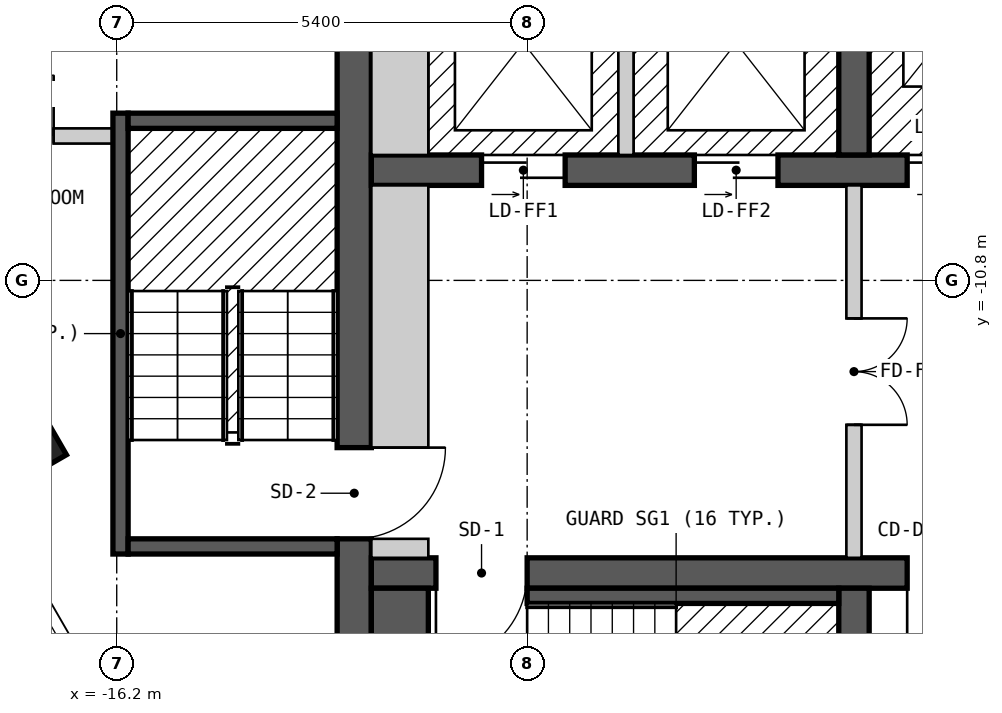
"""IFC4 building model, lengths in metres.
Left out: names, types, materials, properties, quantities, classifications, styles, units other than length and angle.
Written with IfcOpenShell. Run it as: python <this file> out.ifc"""

import sys

from ifc_helpers import new_model, si_unit, direction, frame, frame_2d, origin, origin_2d, place, context, subcontext, project, spatial, polyline, rectangle, outline, extrude, element, fill, save


model = new_model("IFC4")
c1 = context("Model", 3, precision=1e-05, world=origin(), true_north=direction((0.0, 1.0)))
c2 = subcontext(c1, "Body", "Model", "MODEL_VIEW")
j1 = project(units=[si_unit("LENGTHUNIT", "METRE"), si_unit("PLANEANGLEUNIT", "RADIAN")], contexts=[c1])
p1 = place(None, origin())
s1 = spatial("IfcSite", under=j1, at=p1, CompositionType="ELEMENT")
p2 = place(p1, origin())
s2 = spatial("IfcBuilding", under=s1, at=p2, CompositionType="ELEMENT")
p3 = place(p2, frame((0.0, 0.0, 229.8)))
s3 = spatial("IfcBuildingStorey", under=s2, at=p3, CompositionType="ELEMENT", Elevation=229.8)
p4 = place(p3, frame((-17.34, -12.966, 0.0), z_axis=(0.0, 0.0, 1.0), x_axis=(0.499984884929, -0.866034130299, 0.0)))
e1 = element("IfcColumn", 1, at=p4, inside=s3, PredefinedType="COLUMN", context=c2, shape_type="SweptSolid", body=[
    extrude(rectangle(XDim=0.7, YDim=0.7, at=origin_2d()), origin(), (0.0, 0.0, 1.0), 3.0),
])
p5 = place(p3, frame((-13.075, -18.55, 0.0), z_axis=(0.0, 0.0, 1.0), x_axis=(0.0, 1.0, 0.0)))
e2 = element("IfcWall", 2, at=p5, inside=s3, PredefinedType="SHEAR", context=c2, shape_type="SweptSolid", body=[
    extrude(rectangle(XDim=13.1, YDim=0.45, at=frame_2d((6.55, 0.0))), origin(), (0.0, 0.0, 1.0), 2.7),
])
p6 = place(p5, frame((4.35, 0.0, 0.0)))
e3 = element("IfcOpeningElement", 3, at=p6, cuts=e2, PredefinedType="OPENING", context=c2, shape_type="SweptSolid", body=[
    extrude(rectangle(XDim=1.2, YDim=2.1, at=frame_2d((0.6, 1.05))), frame((0.0, 0.235, 0.0), z_axis=(0.0, -1.0, 0.0), x_axis=(1.0, 0.0, 0.0)), (0.0, 0.0, 1.0), 0.47),
])
p7 = place(p3, frame((-12.85, -14.65, 0.0), z_axis=(0.0, 0.0, 1.0), x_axis=(1.0, 0.0, 0.0)))
e4 = element("IfcWall", 4, at=p7, inside=s3, PredefinedType="SHEAR", context=c2, shape_type="SweptSolid", body=[
    extrude(rectangle(XDim=25.7, YDim=0.4, at=frame_2d((12.85, 0.0))), origin(), (0.0, 0.0, 1.0), 2.7),
])
p8 = place(p7, frame((2.05, 0.0, 0.0), z_axis=(0.0, 0.0, 1.0), x_axis=(-1.0, 0.0, 0.0)))
e5 = element("IfcOpeningElement", 5, at=p8, cuts=e4, PredefinedType="OPENING", context=c2, shape_type="SweptSolid", body=[
    extrude(rectangle(XDim=1.2, YDim=2.1, at=frame_2d((0.6, 1.05))), frame((0.0, 0.21, 0.0), z_axis=(0.0, -1.0, 0.0), x_axis=(1.0, 0.0, 0.0)), (0.0, 0.0, 1.0), 0.42),
])
p9 = place(p7, frame((24.9, 0.0, 0.0), z_axis=(0.0, 0.0, 1.0), x_axis=(-1.0, 0.0, 0.0)))
e6 = element("IfcOpeningElement", 6, at=p9, cuts=e4, PredefinedType="OPENING", context=c2, shape_type="SweptSolid", body=[
    extrude(rectangle(XDim=1.2, YDim=2.1, at=frame_2d((0.6, 1.05))), frame((0.0, 0.21, 0.0), z_axis=(0.0, -1.0, 0.0), x_axis=(1.0, 0.0, 0.0)), (0.0, 0.0, 1.0), 0.42),
])
p10 = place(p7, frame((7.95, 0.0, 0.0), z_axis=(0.0, 0.0, 1.0), x_axis=(-1.0, 0.0, 0.0)))
e7 = element("IfcOpeningElement", 7, at=p10, cuts=e4, PredefinedType="OPENING", context=c2, shape_type="SweptSolid", body=[
    extrude(rectangle(XDim=0.9, YDim=2.1, at=frame_2d((0.45, 1.05))), frame((0.0, 0.21, 0.0), z_axis=(0.0, -1.0, 0.0), x_axis=(1.0, 0.0, 0.0)), (0.0, 0.0, 1.0), 0.42),
])
p11 = place(p7, frame((10.0, 0.0, 0.0), z_axis=(0.0, 0.0, 1.0), x_axis=(-1.0, 0.0, 0.0)))
e8 = element("IfcOpeningElement", 8, at=p11, cuts=e4, PredefinedType="OPENING", context=c2, shape_type="SweptSolid", body=[
    extrude(rectangle(XDim=0.9, YDim=2.1, at=frame_2d((0.45, 1.05))), frame((0.0, 0.21, 0.0), z_axis=(0.0, -1.0, 0.0), x_axis=(1.0, 0.0, 0.0)), (0.0, 0.0, 1.0), 0.42),
])
p12 = place(p7, frame((12.3, 0.0, 0.0), z_axis=(0.0, 0.0, 1.0), x_axis=(-1.0, 0.0, 0.0)))
e9 = element("IfcOpeningElement", 9, at=p12, cuts=e4, PredefinedType="OPENING", context=c2, shape_type="SweptSolid", body=[
    extrude(rectangle(XDim=1.0, YDim=2.1, at=frame_2d((0.5, 1.05))), frame((0.0, 0.21, 0.0), z_axis=(0.0, -1.0, 0.0), x_axis=(1.0, 0.0, 0.0)), (0.0, 0.0, 1.0), 0.42),
])
p13 = place(p7, frame((14.5, 0.0, 0.0), z_axis=(0.0, 0.0, 1.0), x_axis=(-1.0, 0.0, 0.0)))
e10 = element("IfcOpeningElement", 10, at=p13, cuts=e4, PredefinedType="OPENING", context=c2, shape_type="SweptSolid", body=[
    extrude(rectangle(XDim=0.9, YDim=2.1, at=frame_2d((0.45, 1.05))), frame((0.0, 0.21, 0.0), z_axis=(0.0, -1.0, 0.0), x_axis=(1.0, 0.0, 0.0)), (0.0, 0.0, 1.0), 0.42),
])
p14 = place(p7, frame((16.5, 0.0, 0.0), z_axis=(0.0, 0.0, 1.0), x_axis=(-1.0, 0.0, 0.0)))
e11 = element("IfcOpeningElement", 11, at=p14, cuts=e4, PredefinedType="OPENING", context=c2, shape_type="SweptSolid", body=[
    extrude(rectangle(XDim=0.9, YDim=2.1, at=frame_2d((0.45, 1.05))), frame((0.0, 0.21, 0.0), z_axis=(0.0, -1.0, 0.0), x_axis=(1.0, 0.0, 0.0)), (0.0, 0.0, 1.0), 0.42),
])
p15 = place(p7, frame((18.65, 0.0, 0.0), z_axis=(0.0, 0.0, 1.0), x_axis=(-1.0, 0.0, 0.0)))
e12 = element("IfcOpeningElement", 12, at=p15, cuts=e4, PredefinedType="OPENING", context=c2, shape_type="SweptSolid", body=[
    extrude(rectangle(XDim=1.0, YDim=2.1, at=frame_2d((0.5, 1.05))), frame((0.0, 0.21, 0.0), z_axis=(0.0, -1.0, 0.0), x_axis=(1.0, 0.0, 0.0)), (0.0, 0.0, 1.0), 0.42),
])
p16 = place(p3, frame((-12.85, -9.35, 0.0), z_axis=(0.0, 0.0, 1.0), x_axis=(1.0, 0.0, 0.0)))
e13 = element("IfcWall", 13, at=p16, inside=s3, PredefinedType="SHEAR", context=c2, shape_type="SweptSolid", body=[
    extrude(rectangle(XDim=23.05, YDim=0.4, at=frame_2d((11.525, 0.0))), origin(), (0.0, 0.0, 1.0), 2.7),
])
p17 = place(p16, frame((1.45, 0.0, 0.0)))
e14 = element("IfcOpeningElement", 14, at=p17, cuts=e13, PredefinedType="OPENING", context=c2, shape_type="SweptSolid", body=[
    extrude(rectangle(XDim=1.1, YDim=2.1, at=frame_2d((0.55, 1.05))), frame((0.0, 0.21, 0.0), z_axis=(0.0, -1.0, 0.0), x_axis=(1.0, 0.0, 0.0)), (0.0, 0.0, 1.0), 0.42),
])
p18 = place(p16, frame((4.25, 0.0, 0.0)))
e15 = element("IfcOpeningElement", 15, at=p18, cuts=e13, PredefinedType="OPENING", context=c2, shape_type="SweptSolid", body=[
    extrude(rectangle(XDim=1.1, YDim=2.1, at=frame_2d((0.55, 1.05))), frame((0.0, 0.21, 0.0), z_axis=(0.0, -1.0, 0.0), x_axis=(1.0, 0.0, 0.0)), (0.0, 0.0, 1.0), 0.42),
])
p19 = place(p16, frame((7.05, 0.0, 0.0)))
e16 = element("IfcOpeningElement", 16, at=p19, cuts=e13, PredefinedType="OPENING", context=c2, shape_type="SweptSolid", body=[
    extrude(rectangle(XDim=1.1, YDim=2.1, at=frame_2d((0.55, 1.05))), frame((0.0, 0.21, 0.0), z_axis=(0.0, -1.0, 0.0), x_axis=(1.0, 0.0, 0.0)), (0.0, 0.0, 1.0), 0.42),
])
p20 = place(p16, frame((9.35, 0.0, 0.0)))
e17 = element("IfcOpeningElement", 17, at=p20, cuts=e13, PredefinedType="OPENING", context=c2, shape_type="SweptSolid", body=[
    extrude(rectangle(XDim=1.1, YDim=2.1, at=frame_2d((0.55, 1.05))), frame((0.0, 0.21, 0.0), z_axis=(0.0, -1.0, 0.0), x_axis=(1.0, 0.0, 0.0)), (0.0, 0.0, 1.0), 0.42),
])
p21 = place(p16, frame((11.65, 0.0, 0.0)))
e18 = element("IfcOpeningElement", 18, at=p21, cuts=e13, PredefinedType="OPENING", context=c2, shape_type="SweptSolid", body=[
    extrude(rectangle(XDim=1.1, YDim=2.1, at=frame_2d((0.55, 1.05))), frame((0.0, 0.21, 0.0), z_axis=(0.0, -1.0, 0.0), x_axis=(1.0, 0.0, 0.0)), (0.0, 0.0, 1.0), 0.42),
])
p22 = place(p16, frame((13.95, 0.0, 0.0)))
e19 = element("IfcOpeningElement", 19, at=p22, cuts=e13, PredefinedType="OPENING", context=c2, shape_type="SweptSolid", body=[
    extrude(rectangle(XDim=1.1, YDim=2.1, at=frame_2d((0.55, 1.05))), frame((0.0, 0.21, 0.0), z_axis=(0.0, -1.0, 0.0), x_axis=(1.0, 0.0, 0.0)), (0.0, 0.0, 1.0), 0.42),
])
p23 = place(p16, frame((16.25, 0.0, 0.0)))
e20 = element("IfcOpeningElement", 20, at=p23, cuts=e13, PredefinedType="OPENING", context=c2, shape_type="SweptSolid", body=[
    extrude(rectangle(XDim=1.1, YDim=2.1, at=frame_2d((0.55, 1.05))), frame((0.0, 0.21, 0.0), z_axis=(0.0, -1.0, 0.0), x_axis=(1.0, 0.0, 0.0)), (0.0, 0.0, 1.0), 0.42),
])
p24 = place(p16, frame((18.55, 0.0, 0.0)))
e21 = element("IfcOpeningElement", 21, at=p24, cuts=e13, PredefinedType="OPENING", context=c2, shape_type="SweptSolid", body=[
    extrude(rectangle(XDim=1.1, YDim=2.1, at=frame_2d((0.55, 1.05))), frame((0.0, 0.21, 0.0), z_axis=(0.0, -1.0, 0.0), x_axis=(1.0, 0.0, 0.0)), (0.0, 0.0, 1.0), 0.42),
])
p25 = place(p16, frame((20.95, 0.0, 0.0)))
e22 = element("IfcOpeningElement", 22, at=p25, cuts=e13, PredefinedType="OPENING", context=c2, shape_type="SweptSolid", body=[
    extrude(rectangle(XDim=1.1, YDim=2.1, at=frame_2d((0.55, 1.05))), frame((0.0, 0.21, 0.0), z_axis=(0.0, -1.0, 0.0), x_axis=(1.0, 0.0, 0.0)), (0.0, 0.0, 1.0), 0.42),
])
for number, where, z_axis, x_axis in (
    (23, (-6.5, -18.55, 0.0), (0.0, 0.0, 1.0), (0.0, 1.0, 0.0)),
    (24, (-6.5, -9.15, 0.0), (0.0, 0.0, 1.0), (0.0, 1.0, 0.0)),
):
    element("IfcWall", number, at=place(p3, frame(where, z_axis=z_axis, x_axis=x_axis)), inside=s3, PredefinedType="SHEAR", context=c2, shape_type="SweptSolid", body=[
        extrude(rectangle(XDim=3.7, YDim=0.4, at=frame_2d((1.85, 0.0))), origin(), (0.0, 0.0, 1.0), 2.7),
    ])
p26 = place(p3, frame((-23.599, -4.025, 0.0), z_axis=(0.0, 0.0, 1.0), x_axis=(0.500012653391, -0.866018098222, 0.0)))
e25 = element("IfcWall", 25, at=p26, inside=s3, PredefinedType="SOLIDWALL", context=c2, shape_type="SweptSolid", body=[
    extrude(outline(polyline([(0.0, -0.15), (16.628, -0.15), (16.548, 0.15), (0.08, 0.15), (0.0, -0.15)])), origin(), (0.0, 0.0, 1.0), 2.7),
])
p27 = place(p26, frame((2.444, 0.0, 0.15)))
e26 = element("IfcOpeningElement", 26, at=p27, cuts=e25, PredefinedType="OPENING", context=c2, shape_type="SweptSolid", body=[
    extrude(rectangle(XDim=1.5, YDim=2.1, at=frame_2d((0.75, 1.05))), frame((0.0, 0.16, 0.0), z_axis=(0.0, -1.0, 0.0), x_axis=(1.0, 0.0, 0.0)), (0.0, 0.0, 1.0), 0.32),
])
p28 = place(p26, frame((7.564, 0.0, 0.15)))
e27 = element("IfcOpeningElement", 27, at=p28, cuts=e25, PredefinedType="OPENING", context=c2, shape_type="SweptSolid", body=[
    extrude(rectangle(XDim=1.5, YDim=2.1, at=frame_2d((0.75, 1.05))), frame((0.0, 0.16, 0.0), z_axis=(0.0, -1.0, 0.0), x_axis=(1.0, 0.0, 0.0)), (0.0, 0.0, 1.0), 0.32),
])
p29 = place(p26, frame((12.682, 0.0, 0.15)))
e28 = element("IfcOpeningElement", 28, at=p29, cuts=e25, PredefinedType="OPENING", context=c2, shape_type="SweptSolid", body=[
    extrude(rectangle(XDim=1.5, YDim=2.1, at=frame_2d((0.75, 1.05))), frame((0.0, 0.16, 0.0), z_axis=(0.0, -1.0, 0.0), x_axis=(1.0, 0.0, 0.0)), (0.0, 0.0, 1.0), 0.32),
])
p30 = place(p3, frame((-18.749, -8.9, 0.0), z_axis=(0.0, 0.0, 1.0), x_axis=(1.0, 0.0, 0.0)))
e29 = element("IfcWall", 29, at=p30, inside=s3, PredefinedType="PARTITIONING", context=c2, shape_type="SweptSolid", body=[
    extrude(rectangle(XDim=2.699, YDim=0.2, at=frame_2d((1.35, 0.0))), origin(), (0.0, 0.0, 1.0), 2.7),
])
p31 = place(p30, frame((0.919, 0.0, 0.0)))
e30 = element("IfcOpeningElement", 30, at=p31, cuts=e29, PredefinedType="OPENING", context=c2, shape_type="SweptSolid", body=[
    extrude(rectangle(XDim=0.8, YDim=2.1, at=frame_2d((0.4, 1.05))), frame((0.0, 0.11, 0.0), z_axis=(0.0, -1.0, 0.0), x_axis=(1.0, 0.0, 0.0)), (0.0, 0.0, 1.0), 0.22),
])
p32 = place(p3, frame((-16.15, -14.4, 0.0), z_axis=(0.0, 0.0, 1.0), x_axis=(0.0, 1.0, 0.0)))
e31 = element("IfcWall", 31, at=p32, inside=s3, PredefinedType="SOLIDWALL", context=c2, shape_type="SweptSolid", body=[
    extrude(rectangle(XDim=5.8, YDim=0.2, at=frame_2d((2.9, 0.0))), origin(), (0.0, 0.0, 1.0), 2.7),
])
for number, where, z_axis, x_axis in (
    (32, (-16.05, -14.3, 0.0), (0.0, 0.0, 1.0), (1.0, 0.0, 0.0)),
    (33, (-16.05, -8.7, 0.0), (0.0, 0.0, 1.0), (1.0, 0.0, 0.0)),
):
    element("IfcWall", number, at=place(p3, frame(where, z_axis=z_axis, x_axis=x_axis)), inside=s3, PredefinedType="SOLIDWALL", context=c2, shape_type="SweptSolid", body=[
        extrude(rectangle(XDim=2.75, YDim=0.2, at=frame_2d((1.375, 0.0))), origin(), (0.0, 0.0, 1.0), 2.7),
    ])
p33 = place(p3, frame((-12.475, -18.55, 0.0), z_axis=(0.0, 0.0, 1.0), x_axis=(0.0, 1.0, 0.0)))
e34 = element("IfcWall", 34, at=p33, inside=s3, PredefinedType="SOLIDWALL", context=c2, shape_type="SweptSolid", body=[
    extrude(rectangle(XDim=3.7, YDim=0.75, at=frame_2d((1.85, 0.0))), origin(), (0.0, 0.0, 1.0), 2.7),
])
p34 = place(p3, frame((-12.85, -14.325, 0.0), z_axis=(0.0, 0.0, 1.0), x_axis=(1.0, 0.0, 0.0)))
e35 = element("IfcWall", 35, at=p34, inside=s3, PredefinedType="PARTITIONING", context=c2, shape_type="SweptSolid", body=[
    extrude(rectangle(XDim=0.75, YDim=0.25, at=frame_2d((0.375, 0.0))), origin(), (0.0, 0.0, 1.0), 2.7),
])
p35 = place(p3, frame((-12.475, -13.0, 0.0), z_axis=(0.0, 0.0, 1.0), x_axis=(0.0, 1.0, 0.0)))
e36 = element("IfcWall", 36, at=p35, inside=s3, PredefinedType="PARTITIONING", context=c2, shape_type="SweptSolid", body=[
    extrude(rectangle(XDim=3.45, YDim=0.75, at=frame_2d((1.725, 0.0))), origin(), (0.0, 0.0, 1.0), 2.7),
])
p36 = place(p3, frame((-12.475, -9.15, 0.0), z_axis=(0.0, 0.0, 1.0), x_axis=(0.0, 1.0, 0.0)))
e37 = element("IfcWall", 37, at=p36, inside=s3, PredefinedType="SOLIDWALL", context=c2, shape_type="SweptSolid", body=[
    extrude(rectangle(XDim=3.7, YDim=0.75, at=frame_2d((1.85, 0.0))), origin(), (0.0, 0.0, 1.0), 2.7),
])
p37 = place(p3, frame((-10.8, -14.95, 0.0), z_axis=(0.0, 0.0, 1.0), x_axis=(1.0, 0.0, 0.0)))
e38 = element("IfcWall", 38, at=p37, inside=s3, PredefinedType="SOLIDWALL", context=c2, shape_type="SweptSolid", body=[
    extrude(rectangle(XDim=4.1, YDim=0.2, at=frame_2d((2.05, 0.0))), origin(), (0.0, 0.0, 1.0), 2.7),
])
p38 = place(p3, frame((-9.5, -9.15, 0.0), z_axis=(0.0, 0.0, 1.0), x_axis=(0.0, 1.0, 0.0)))
e39 = element("IfcWall", 39, at=p38, inside=s3, PredefinedType="SOLIDWALL", context=c2, shape_type="SweptSolid", body=[
    extrude(rectangle(XDim=2.95, YDim=0.2, at=frame_2d((1.475, 0.0))), origin(), (0.0, 0.0, 1.0), 2.7),
])
p39 = place(p3, frame((-6.5, -14.45, 0.0), z_axis=(0.0, 0.0, 1.0), x_axis=(0.0, 1.0, 0.0)))
e40 = element("IfcWall", 40, at=p39, inside=s3, PredefinedType="PARTITIONING", context=c2, shape_type="SweptSolid", body=[
    extrude(rectangle(XDim=4.9, YDim=0.2, at=frame_2d((2.45, 0.0))), origin(), (0.0, 0.0, 1.0), 2.7),
])
p40 = place(p39, frame((3.15, 0.0, 0.0), z_axis=(0.0, 0.0, 1.0), x_axis=(-1.0, 0.0, 0.0)))
e41 = element("IfcOpeningElement", 41, at=p40, cuts=e40, PredefinedType="OPENING", context=c2, shape_type="SweptSolid", body=[
    extrude(rectangle(XDim=1.4, YDim=2.1, at=frame_2d((0.7, 1.05))), frame((0.0, 0.11, 0.0), z_axis=(0.0, -1.0, 0.0), x_axis=(1.0, 0.0, 0.0)), (0.0, 0.0, 1.0), 0.22),
])
p41 = place(p29, origin())
e42 = element("IfcWindow", 42, at=p41, inside=s3, PartitioningType="SINGLE_PANEL", PredefinedType="WINDOW", context=c2, shape_type="SweptSolid", body=[
    extrude(rectangle(XDim=1.5, YDim=2.1, at=frame_2d((0.75, 1.05))), frame((0.0, 0.03, 0.0), z_axis=(0.0, -1.0, 0.0), x_axis=(1.0, 0.0, 0.0)), (0.0, 0.0, 1.0), 0.06),
])
fill(e28, e42)
p42 = place(p31, origin())
e43 = element("IfcDoor", 43, at=p42, inside=s3, OperationType="SINGLE_SWING_RIGHT", PredefinedType="DOOR", context=c2, shape_type="SweptSolid", body=[
    extrude(rectangle(XDim=0.8, YDim=2.1, at=frame_2d((0.4, 1.05))), frame((0.0, 0.025, 0.0), z_axis=(0.0, -1.0, 0.0), x_axis=(1.0, 0.0, 0.0)), (0.0, 0.0, 1.0), 0.05),
])
fill(e30, e43)
p43 = place(p17, origin())
e44 = element("IfcDoor", 44, at=p43, inside=s3, OperationType="DOUBLE_DOOR_SLIDING", PredefinedType="DOOR", context=c2, shape_type="SweptSolid", body=[
    extrude(rectangle(XDim=1.1, YDim=2.1, at=frame_2d((0.55, 1.05))), frame((0.0, 0.025, 0.0), z_axis=(0.0, -1.0, 0.0), x_axis=(1.0, 0.0, 0.0)), (0.0, 0.0, 1.0), 0.05),
])
fill(e14, e44)
p44 = place(p18, origin())
e45 = element("IfcDoor", 45, at=p44, inside=s3, OperationType="DOUBLE_DOOR_SLIDING", PredefinedType="DOOR", context=c2, shape_type="SweptSolid", body=[
    extrude(rectangle(XDim=1.1, YDim=2.1, at=frame_2d((0.55, 1.05))), frame((0.0, 0.025, 0.0), z_axis=(0.0, -1.0, 0.0), x_axis=(1.0, 0.0, 0.0)), (0.0, 0.0, 1.0), 0.05),
])
fill(e15, e45)
p45 = place(p19, origin())
e46 = element("IfcDoor", 46, at=p45, inside=s3, OperationType="DOUBLE_DOOR_SLIDING", PredefinedType="DOOR", context=c2, shape_type="SweptSolid", body=[
    extrude(rectangle(XDim=1.1, YDim=2.1, at=frame_2d((0.55, 1.05))), frame((0.0, 0.025, 0.0), z_axis=(0.0, -1.0, 0.0), x_axis=(1.0, 0.0, 0.0)), (0.0, 0.0, 1.0), 0.05),
])
fill(e16, e46)
p46 = place(p8, origin())
e47 = element("IfcDoor", 47, at=p46, inside=s3, OperationType="SINGLE_SWING_RIGHT", PredefinedType="DOOR", context=c2, shape_type="SweptSolid", body=[
    extrude(rectangle(XDim=1.2, YDim=2.1, at=frame_2d((0.6, 1.05))), frame((0.0, 0.025, 0.0), z_axis=(0.0, -1.0, 0.0), x_axis=(1.0, 0.0, 0.0)), (0.0, 0.0, 1.0), 0.05),
])
fill(e5, e47)
p47 = place(p6, origin())
e48 = element("IfcDoor", 48, at=p47, inside=s3, OperationType="SINGLE_SWING_RIGHT", PredefinedType="DOOR", context=c2, shape_type="SweptSolid", body=[
    extrude(rectangle(XDim=1.2, YDim=2.1, at=frame_2d((0.6, 1.05))), frame((0.0, 0.025, 0.0), z_axis=(0.0, -1.0, 0.0), x_axis=(1.0, 0.0, 0.0)), (0.0, 0.0, 1.0), 0.05),
])
fill(e3, e48)
p48 = place(p40, origin())
e49 = element("IfcDoor", 49, at=p48, inside=s3, OperationType="DOUBLE_DOOR_SINGLE_SWING", PredefinedType="DOOR", context=c2, shape_type="SweptSolid", body=[
    extrude(rectangle(XDim=1.4, YDim=2.1, at=frame_2d((0.7, 1.05))), frame((0.0, 0.025, 0.0), z_axis=(0.0, -1.0, 0.0), x_axis=(1.0, 0.0, 0.0)), (0.0, 0.0, 1.0), 0.05),
])
fill(e41, e49)
p49 = place(p10, origin())
e50 = element("IfcDoor", 50, at=p49, inside=s3, OperationType="SINGLE_SWING_RIGHT", PredefinedType="DOOR", context=c2, shape_type="SweptSolid", body=[
    extrude(rectangle(XDim=0.9, YDim=2.1, at=frame_2d((0.45, 1.05))), frame((0.0, 0.025, 0.0), z_axis=(0.0, -1.0, 0.0), x_axis=(1.0, 0.0, 0.0)), (0.0, 0.0, 1.0), 0.05),
])
fill(e7, e50)
save(model, sys.argv[1])
